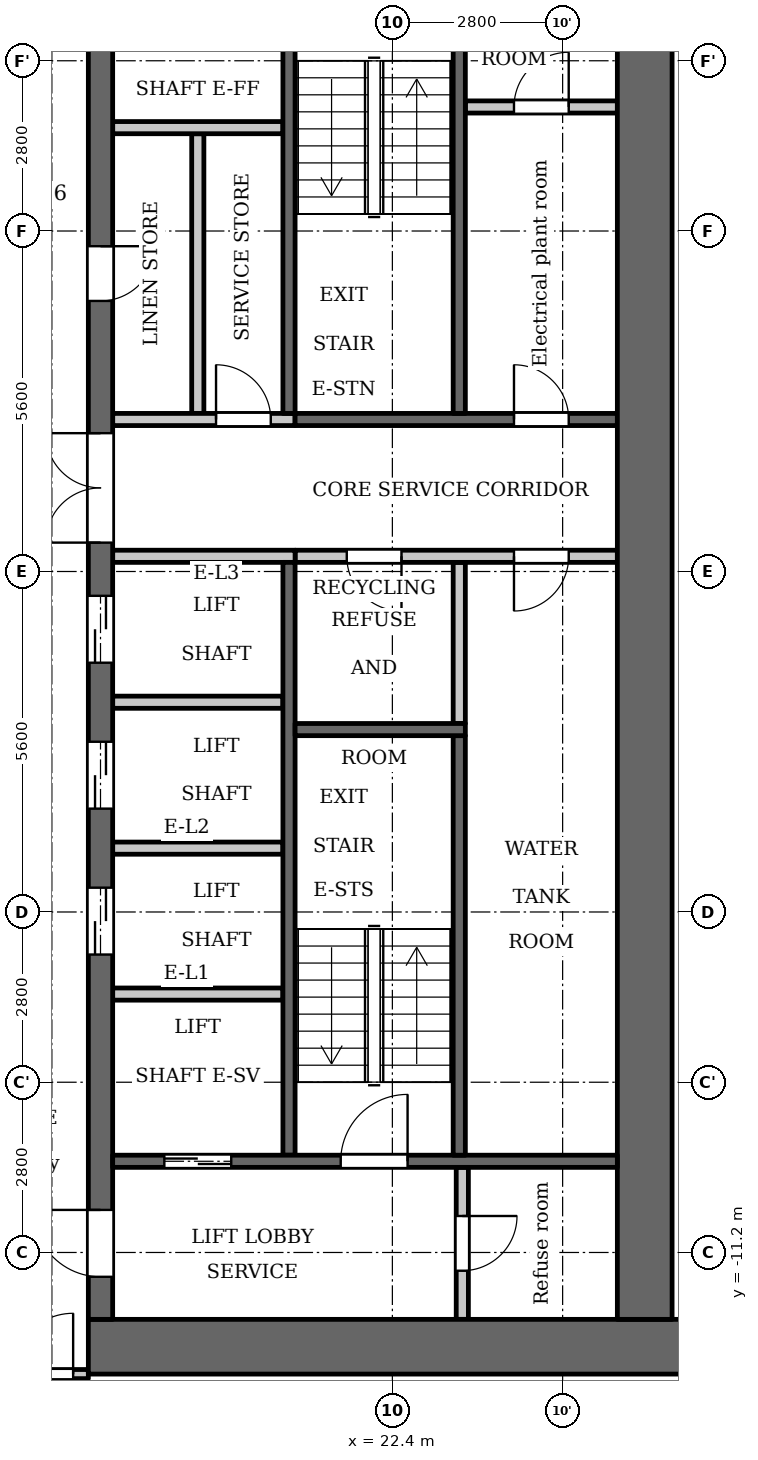
"""IFC4 building model, lengths in metres.
Left out: names, types, materials, properties, quantities, classifications, styles, units other than length and angle.
Written with IfcOpenShell. Run it as: python <this file> out.ifc"""

import sys

from ifc_helpers import new_model, si_unit, direction, frame, frame_2d, origin, place, context, subcontext, project, spatial, rectangle, extrude, element, fill, save


model = new_model("IFC4")
c1 = context("Model", 3, precision=1e-05, world=origin(), true_north=direction((0.0, 1.0)))
c2 = subcontext(c1, "Body", "Model", "MODEL_VIEW")
j1 = project(units=[si_unit("LENGTHUNIT", "METRE"), si_unit("PLANEANGLEUNIT", "RADIAN")], contexts=[c1])
p1 = place(None, origin())
s1 = spatial("IfcSite", under=j1, at=p1, CompositionType="ELEMENT")
p2 = place(p1, origin())
s2 = spatial("IfcBuilding", under=s1, at=p2, CompositionType="ELEMENT")
p3 = place(p2, frame((0.0, 0.0, 104.3)))
s3 = spatial("IfcBuildingStorey", under=s2, at=p3, CompositionType="ELEMENT", Elevation=104.3)
p4 = place(p3, frame((23.5, -2.5, 0.0), z_axis=(0.0, 0.0, 1.0), x_axis=(0.0, 1.0, 0.0)))
e1 = element("IfcWall", 1, at=p4, inside=s3, PredefinedType="PARTITIONING", context=c2, shape_type="SweptSolid", body=[
    extrude(rectangle(XDim=2.65, YDim=0.2, at=frame_2d((1.325, 0.0))), origin(), (0.0, 0.0, 1.0), 3.2),
])
p5 = place(p3, frame((20.7, 2.6, 0.0), z_axis=(0.0, 0.0, 1.0), x_axis=(0.0, 1.0, 0.0)))
e2 = element("IfcWall", 2, at=p5, inside=s3, PredefinedType="SHEAR", context=c2, shape_type="SweptSolid", body=[
    extrude(rectangle(XDim=7.0, YDim=0.2, at=frame_2d((3.5, 0.0))), origin(), (0.0, 0.0, 1.0), 3.2),
])
p6 = place(p3, frame((20.7, -9.6, 0.0), z_axis=(0.0, 0.0, 1.0), x_axis=(0.0, 1.0, 0.0)))
e3 = element("IfcWall", 3, at=p6, inside=s3, PredefinedType="SHEAR", context=c2, shape_type="SweptSolid", body=[
    extrude(rectangle(XDim=9.75, YDim=0.2, at=frame_2d((4.875, 0.0))), origin(), (0.0, 0.0, 1.0), 3.2),
])
p7 = place(p3, frame((20.8, 2.5, 0.0), z_axis=(0.0, 0.0, 1.0), x_axis=(1.0, 0.0, 0.0)))
e4 = element("IfcWall", 4, at=p7, inside=s3, PredefinedType="SHEAR", context=c2, shape_type="SweptSolid", body=[
    extrude(rectangle(XDim=5.3, YDim=0.2, at=frame_2d((2.65, 0.0))), origin(), (0.0, 0.0, 1.0), 3.2),
])
p8 = place(p7, frame((3.6, 0.0, 0.0)))
e5 = element("IfcOpeningElement", 5, at=p8, cuts=e4, PredefinedType="OPENING", context=c2, shape_type="SweptSolid", body=[
    extrude(rectangle(XDim=0.9, YDim=2.1, at=frame_2d((0.45, 1.05))), frame((0.0, 0.11, 0.0), z_axis=(0.0, -1.0, 0.0), x_axis=(1.0, 0.0, 0.0)), (0.0, 0.0, 1.0), 0.22),
])
p9 = place(p3, frame((20.8, 0.25, 0.0), z_axis=(0.0, 0.0, 1.0), x_axis=(1.0, 0.0, 0.0)))
e6 = element("IfcWall", 6, at=p9, inside=s3, PredefinedType="PARTITIONING", context=c2, shape_type="SweptSolid", body=[
    extrude(rectangle(XDim=5.3, YDim=0.2, at=frame_2d((2.65, 0.0))), origin(), (0.0, 0.0, 1.0), 3.2),
])
p10 = place(p9, frame((0.85, 0.0, 0.0)))
e7 = element("IfcOpeningElement", 7, at=p10, cuts=e6, PredefinedType="OPENING", context=c2, shape_type="SweptSolid", body=[
    extrude(rectangle(XDim=0.9, YDim=2.1, at=frame_2d((0.45, 1.05))), frame((0.0, 0.11, 0.0), z_axis=(0.0, -1.0, 0.0), x_axis=(1.0, 0.0, 0.0)), (0.0, 0.0, 1.0), 0.22),
])
p11 = place(p9, frame((3.6, 0.0, 0.0)))
e8 = element("IfcOpeningElement", 8, at=p11, cuts=e6, PredefinedType="OPENING", context=c2, shape_type="SweptSolid", body=[
    extrude(rectangle(XDim=0.9, YDim=2.1, at=frame_2d((0.45, 1.05))), frame((0.0, 0.11, 0.0), z_axis=(0.0, -1.0, 0.0), x_axis=(1.0, 0.0, 0.0)), (0.0, 0.0, 1.0), 0.22),
])
p12 = place(p3, frame((17.4, -12.75, 0.0), z_axis=(0.0, 0.0, 1.0), x_axis=(1.0, 0.0, 0.0)))
e9 = element("IfcWall", 9, at=p12, inside=s3, PredefinedType="SHEAR", context=c2, shape_type="SweptSolid", body=[
    extrude(rectangle(XDim=10.4, YDim=0.9, at=frame_2d((5.2, 0.0))), origin(), (0.0, 0.0, 1.0), 3.2),
])
p13 = place(p3, frame((19.2, 2.6, 0.0), z_axis=(0.0, 0.0, 1.0), x_axis=(0.0, 1.0, 0.0)))
e10 = element("IfcWall", 10, at=p13, inside=s3, PredefinedType="PARTITIONING", context=c2, shape_type="SweptSolid", body=[
    extrude(rectangle(XDim=4.6, YDim=0.2, at=frame_2d((2.3, 0.0))), origin(), (0.0, 0.0, 1.0), 3.2),
])
p14 = place(p3, frame((17.6, -12.3, 0.0), z_axis=(0.0, 0.0, 1.0), x_axis=(0.0, 1.0, 0.0)))
e11 = element("IfcWall", 11, at=p14, inside=s3, PredefinedType="SHEAR", context=c2, shape_type="SweptSolid", body=[
    extrude(rectangle(XDim=24.6, YDim=0.4, at=frame_2d((12.3, 0.0))), origin(), (0.0, 0.0, 1.0), 3.2),
])
p15 = place(p14, frame((6.0, 0.0, 0.0)))
e12 = element("IfcOpeningElement", 12, at=p15, cuts=e11, PredefinedType="OPENING", context=c2, shape_type="SweptSolid", body=[
    extrude(rectangle(XDim=1.1, YDim=2.1, at=frame_2d((0.55, 1.05))), frame((0.0, 0.21, 0.0), z_axis=(0.0, -1.0, 0.0), x_axis=(1.0, 0.0, 0.0)), (0.0, 0.0, 1.0), 0.42),
])
p16 = place(p14, frame((8.4, 0.0, 0.0)))
e13 = element("IfcOpeningElement", 13, at=p16, cuts=e11, PredefinedType="OPENING", context=c2, shape_type="SweptSolid", body=[
    extrude(rectangle(XDim=1.1, YDim=2.1, at=frame_2d((0.55, 1.05))), frame((0.0, 0.21, 0.0), z_axis=(0.0, -1.0, 0.0), x_axis=(1.0, 0.0, 0.0)), (0.0, 0.0, 1.0), 0.42),
])
p17 = place(p14, frame((10.8, 0.0, 0.0)))
e14 = element("IfcOpeningElement", 14, at=p17, cuts=e11, PredefinedType="OPENING", context=c2, shape_type="SweptSolid", body=[
    extrude(rectangle(XDim=1.1, YDim=2.1, at=frame_2d((0.55, 1.05))), frame((0.0, 0.21, 0.0), z_axis=(0.0, -1.0, 0.0), x_axis=(1.0, 0.0, 0.0)), (0.0, 0.0, 1.0), 0.42),
])
p18 = place(p14, frame((16.75, 0.0, 0.0)))
e15 = element("IfcOpeningElement", 15, at=p18, cuts=e11, PredefinedType="OPENING", context=c2, shape_type="SweptSolid", body=[
    extrude(rectangle(XDim=0.9, YDim=2.1, at=frame_2d((0.45, 1.05))), frame((0.0, 0.21, 0.0), z_axis=(0.0, -1.0, 0.0), x_axis=(1.0, 0.0, 0.0)), (0.0, 0.0, 1.0), 0.42),
])
p19 = place(p14, frame((22.8, 0.0, 0.0)))
e16 = element("IfcOpeningElement", 16, at=p19, cuts=e11, PredefinedType="OPENING", context=c2, shape_type="SweptSolid", body=[
    extrude(rectangle(XDim=1.1, YDim=2.1, at=frame_2d((0.55, 1.05))), frame((0.0, 0.21, 0.0), z_axis=(0.0, -1.0, 0.0), x_axis=(1.0, 0.0, 0.0)), (0.0, 0.0, 1.0), 0.42),
])
p20 = place(p14, frame((0.7, 0.0, 0.0)))
e17 = element("IfcOpeningElement", 17, at=p20, cuts=e11, PredefinedType="OPENING", context=c2, shape_type="SweptSolid", body=[
    extrude(rectangle(XDim=1.1, YDim=2.1, at=frame_2d((0.55, 1.05))), frame((0.0, 0.21, 0.0), z_axis=(0.0, -1.0, 0.0), x_axis=(1.0, 0.0, 0.0)), (0.0, 0.0, 1.0), 0.42),
])
p21 = place(p14, frame((12.775, 0.0, 0.0)))
e18 = element("IfcOpeningElement", 18, at=p21, cuts=e11, PredefinedType="OPENING", context=c2, shape_type="SweptSolid", body=[
    extrude(rectangle(XDim=1.8, YDim=2.1, at=frame_2d((0.9, 1.05))), frame((0.0, 0.21, 0.0), z_axis=(0.0, -1.0, 0.0), x_axis=(1.0, 0.0, 0.0)), (0.0, 0.0, 1.0), 0.42),
])
p22 = place(p3, frame((26.55, -12.3, 0.0), z_axis=(0.0, 0.0, 1.0), x_axis=(0.0, 1.0, 0.0)))
e19 = element("IfcWall", 19, at=p22, inside=s3, PredefinedType="SHEAR", context=c2, shape_type="SweptSolid", body=[
    extrude(rectangle(XDim=24.6, YDim=0.9, at=frame_2d((12.3, 0.0))), origin(), (0.0, 0.0, 1.0), 3.2),
])
p23 = place(p3, frame((23.55, -12.3, 0.0), z_axis=(0.0, 0.0, 1.0), x_axis=(0.0, 1.0, 0.0)))
e20 = element("IfcWall", 20, at=p23, inside=s3, PredefinedType="PARTITIONING", context=c2, shape_type="SweptSolid", body=[
    extrude(rectangle(XDim=2.5, YDim=0.2, at=frame_2d((1.25, 0.0))), origin(), (0.0, 0.0, 1.0), 3.2),
])
p24 = place(p23, frame((0.8, 0.0, 0.0)))
e21 = element("IfcOpeningElement", 21, at=p24, cuts=e20, PredefinedType="OPENING", context=c2, shape_type="SweptSolid", body=[
    extrude(rectangle(XDim=0.9, YDim=2.1, at=frame_2d((0.45, 1.05))), frame((0.0, 0.11, 0.0), z_axis=(0.0, -1.0, 0.0), x_axis=(1.0, 0.0, 0.0)), (0.0, 0.0, 1.0), 0.22),
])
p25 = place(p3, frame((23.6, 7.64, 0.0), z_axis=(0.0, 0.0, 1.0), x_axis=(1.0, 0.0, 0.0)))
e22 = element("IfcWall", 22, at=p25, inside=s3, PredefinedType="PARTITIONING", context=c2, shape_type="SweptSolid", body=[
    extrude(rectangle(XDim=2.5, YDim=0.2, at=frame_2d((1.25, 0.0))), origin(), (0.0, 0.0, 1.0), 3.2),
])
p26 = place(p25, frame((0.8, 0.0, 0.0)))
e23 = element("IfcOpeningElement", 23, at=p26, cuts=e22, PredefinedType="OPENING", context=c2, shape_type="SweptSolid", body=[
    extrude(rectangle(XDim=0.9, YDim=2.1, at=frame_2d((0.45, 1.05))), frame((0.0, 0.11, 0.0), z_axis=(0.0, -1.0, 0.0), x_axis=(1.0, 0.0, 0.0)), (0.0, 0.0, 1.0), 0.22),
])
p27 = place(p3, frame((17.8, -9.7, 0.0), z_axis=(0.0, 0.0, 1.0), x_axis=(1.0, 0.0, 0.0)))
e24 = element("IfcWall", 24, at=p27, inside=s3, PredefinedType="SHEAR", context=c2, shape_type="SweptSolid", body=[
    extrude(rectangle(XDim=8.3, YDim=0.2, at=frame_2d((4.15, 0.0))), origin(), (0.0, 0.0, 1.0), 3.2),
])
p28 = place(p27, frame((0.85, 0.0, 0.0)))
e25 = element("IfcOpeningElement", 25, at=p28, cuts=e24, PredefinedType="OPENING", context=c2, shape_type="SweptSolid", body=[
    extrude(rectangle(XDim=1.1, YDim=2.1, at=frame_2d((0.55, 1.05))), frame((0.0, 0.11, 0.0), z_axis=(0.0, -1.0, 0.0), x_axis=(1.0, 0.0, 0.0)), (0.0, 0.0, 1.0), 0.22),
])
p29 = place(p27, frame((3.75, 0.0, 0.0)))
e26 = element("IfcOpeningElement", 26, at=p29, cuts=e24, PredefinedType="OPENING", context=c2, shape_type="SweptSolid", body=[
    extrude(rectangle(XDim=1.1, YDim=2.1, at=frame_2d((0.55, 1.05))), frame((0.0, 0.11, 0.0), z_axis=(0.0, -1.0, 0.0), x_axis=(1.0, 0.0, 0.0)), (0.0, 0.0, 1.0), 0.22),
])
for number, where, z_axis, x_axis in (
    (27, (17.8, -6.95, 0.0), (0.0, 0.0, 1.0), (1.0, 0.0, 0.0)),
    (28, (17.8, -4.55, 0.0), (0.0, 0.0, 1.0), (1.0, 0.0, 0.0)),
    (29, (17.8, -2.15, 0.0), (0.0, 0.0, 1.0), (1.0, 0.0, 0.0)),
):
    element("IfcWall", number, at=place(p3, frame(where, z_axis=z_axis, x_axis=x_axis)), inside=s3, PredefinedType="PARTITIONING", context=c2, shape_type="SweptSolid", body=[
        extrude(rectangle(XDim=2.8, YDim=0.2, at=frame_2d((1.4, 0.0))), origin(), (0.0, 0.0, 1.0), 3.2),
    ])
p30 = place(p3, frame((17.8, 0.25, 0.0), z_axis=(0.0, 0.0, 1.0), x_axis=(1.0, 0.0, 0.0)))
e30 = element("IfcWall", 30, at=p30, inside=s3, PredefinedType="PARTITIONING", context=c2, shape_type="SweptSolid", body=[
    extrude(rectangle(XDim=3.0, YDim=0.2, at=frame_2d((1.5, 0.0))), origin(), (0.0, 0.0, 1.0), 3.2),
])
p31 = place(p3, frame((17.8, 2.5, 0.0), z_axis=(0.0, 0.0, 1.0), x_axis=(1.0, 0.0, 0.0)))
e31 = element("IfcWall", 31, at=p31, inside=s3, PredefinedType="PARTITIONING", context=c2, shape_type="SweptSolid", body=[
    extrude(rectangle(XDim=3.0, YDim=0.2, at=frame_2d((1.5, 0.0))), origin(), (0.0, 0.0, 1.0), 3.2),
])
p32 = place(p31, frame((1.7, 0.0, 0.0)))
e32 = element("IfcOpeningElement", 32, at=p32, cuts=e31, PredefinedType="OPENING", context=c2, shape_type="SweptSolid", body=[
    extrude(rectangle(XDim=0.9, YDim=2.1, at=frame_2d((0.45, 1.05))), frame((0.0, 0.11, 0.0), z_axis=(0.0, -1.0, 0.0), x_axis=(1.0, 0.0, 0.0)), (0.0, 0.0, 1.0), 0.22),
])
p33 = place(p3, frame((17.8, 7.3, 0.0), z_axis=(0.0, 0.0, 1.0), x_axis=(1.0, 0.0, 0.0)))
e33 = element("IfcWall", 33, at=p33, inside=s3, PredefinedType="PARTITIONING", context=c2, shape_type="SweptSolid", body=[
    extrude(rectangle(XDim=2.8, YDim=0.2, at=frame_2d((1.4, 0.0))), origin(), (0.0, 0.0, 1.0), 3.2),
])
p34 = place(p3, frame((23.5, 2.6, 0.0), z_axis=(0.0, 0.0, 1.0), x_axis=(0.0, 1.0, 0.0)))
e34 = element("IfcWall", 34, at=p34, inside=s3, PredefinedType="SHEAR", context=c2, shape_type="SweptSolid", body=[
    extrude(rectangle(XDim=7.0, YDim=0.2, at=frame_2d((3.5, 0.0))), origin(), (0.0, 0.0, 1.0), 3.2),
])
p35 = place(p3, frame((23.5, -9.6, 0.0), z_axis=(0.0, 0.0, 1.0), x_axis=(0.0, 1.0, 0.0)))
e35 = element("IfcWall", 35, at=p35, inside=s3, PredefinedType="SHEAR", context=c2, shape_type="SweptSolid", body=[
    extrude(rectangle(XDim=6.9, YDim=0.2, at=frame_2d((3.45, 0.0))), origin(), (0.0, 0.0, 1.0), 3.2),
])
p36 = place(p3, frame((20.8, -2.6, 0.0), z_axis=(0.0, 0.0, 1.0), x_axis=(1.0, 0.0, 0.0)))
e36 = element("IfcWall", 36, at=p36, inside=s3, PredefinedType="SHEAR", context=c2, shape_type="SweptSolid", body=[
    extrude(rectangle(XDim=2.8, YDim=0.2, at=frame_2d((1.4, 0.0))), origin(), (0.0, 0.0, 1.0), 3.2),
])
p37 = place(p3, frame((-17.4, -13.2, 0.0), z_axis=(0.0, 0.0, 1.0), x_axis=(1.0, 0.0, 0.0)))
e37 = element("IfcWall", 37, at=p37, inside=s3, PredefinedType="PARTITIONING", context=c2, shape_type="SweptSolid", body=[
    extrude(rectangle(XDim=34.8, YDim=0.15, at=frame_2d((17.4, 0.0))), origin(), (0.0, 0.0, 1.0), 3.2),
])
p38 = place(p37, frame((0.15, 0.0, 0.0)))
e38 = element("IfcOpeningElement", 38, at=p38, cuts=e37, PredefinedType="OPENING", context=c2, shape_type="SweptSolid", body=[
    extrude(rectangle(XDim=1.0, YDim=2.1, at=frame_2d((0.5, 1.05))), frame((0.0, 0.085, 0.0), z_axis=(0.0, -1.0, 0.0), x_axis=(1.0, 0.0, 0.0)), (0.0, 0.0, 1.0), 0.17),
])
p39 = place(p37, frame((33.55, 0.0, 0.0)))
e39 = element("IfcOpeningElement", 39, at=p39, cuts=e37, PredefinedType="OPENING", context=c2, shape_type="SweptSolid", body=[
    extrude(rectangle(XDim=1.0, YDim=2.1, at=frame_2d((0.5, 1.05))), frame((0.0, 0.085, 0.0), z_axis=(0.0, -1.0, 0.0), x_axis=(1.0, 0.0, 0.0)), (0.0, 0.0, 1.0), 0.17),
])
p40 = place(p37, frame((8.1, 0.0, 0.0)))
e40 = element("IfcOpeningElement", 40, at=p40, cuts=e37, PredefinedType="OPENING", context=c2, shape_type="SweptSolid", body=[
    extrude(rectangle(XDim=1.0, YDim=2.1, at=frame_2d((0.5, 1.05))), frame((0.0, 0.085, 0.0), z_axis=(0.0, -1.0, 0.0), x_axis=(1.0, 0.0, 0.0)), (0.0, 0.0, 1.0), 0.17),
])
p41 = place(p37, frame((12.45, 0.0, 0.0)))
e41 = element("IfcOpeningElement", 41, at=p41, cuts=e37, PredefinedType="OPENING", context=c2, shape_type="SweptSolid", body=[
    extrude(rectangle(XDim=1.0, YDim=2.1, at=frame_2d((0.5, 1.05))), frame((0.0, 0.085, 0.0), z_axis=(0.0, -1.0, 0.0), x_axis=(1.0, 0.0, 0.0)), (0.0, 0.0, 1.0), 0.17),
])
p42 = place(p37, frame((19.05, 0.0, 0.0)))
e42 = element("IfcOpeningElement", 42, at=p42, cuts=e37, PredefinedType="OPENING", context=c2, shape_type="SweptSolid", body=[
    extrude(rectangle(XDim=1.0, YDim=2.1, at=frame_2d((0.5, 1.05))), frame((0.0, 0.085, 0.0), z_axis=(0.0, -1.0, 0.0), x_axis=(1.0, 0.0, 0.0)), (0.0, 0.0, 1.0), 0.17),
])
p43 = place(p37, frame((24.9, 0.0, 0.0)))
e43 = element("IfcOpeningElement", 43, at=p43, cuts=e37, PredefinedType="OPENING", context=c2, shape_type="SweptSolid", body=[
    extrude(rectangle(XDim=1.0, YDim=2.1, at=frame_2d((0.5, 1.05))), frame((0.0, 0.085, 0.0), z_axis=(0.0, -1.0, 0.0), x_axis=(1.0, 0.0, 0.0)), (0.0, 0.0, 1.0), 0.17),
])
p44 = place(p28, origin())
e44 = element("IfcDoor", 44, at=p44, inside=s3, OperationType="DOUBLE_DOOR_SLIDING", PredefinedType="DOOR", context=c2, shape_type="SweptSolid", body=[
    extrude(rectangle(XDim=1.1, YDim=2.1, at=frame_2d((0.55, 1.05))), frame((0.0, 0.025, 0.0), z_axis=(0.0, -1.0, 0.0), x_axis=(1.0, 0.0, 0.0)), (0.0, 0.0, 1.0), 0.05),
])
fill(e25, e44)
p45 = place(p15, origin())
e45 = element("IfcDoor", 45, at=p45, inside=s3, OperationType="DOUBLE_DOOR_SLIDING", PredefinedType="DOOR", context=c2, shape_type="SweptSolid", body=[
    extrude(rectangle(XDim=1.1, YDim=2.1, at=frame_2d((0.55, 1.05))), frame((0.0, 0.025, 0.0), z_axis=(0.0, -1.0, 0.0), x_axis=(1.0, 0.0, 0.0)), (0.0, 0.0, 1.0), 0.05),
])
fill(e12, e45)
p46 = place(p16, origin())
e46 = element("IfcDoor", 46, at=p46, inside=s3, OperationType="DOUBLE_DOOR_SLIDING", PredefinedType="DOOR", context=c2, shape_type="SweptSolid", body=[
    extrude(rectangle(XDim=1.1, YDim=2.1, at=frame_2d((0.55, 1.05))), frame((0.0, 0.025, 0.0), z_axis=(0.0, -1.0, 0.0), x_axis=(1.0, 0.0, 0.0)), (0.0, 0.0, 1.0), 0.05),
])
fill(e13, e46)
p47 = place(p17, origin())
e47 = element("IfcDoor", 47, at=p47, inside=s3, OperationType="DOUBLE_DOOR_SLIDING", PredefinedType="DOOR", context=c2, shape_type="SweptSolid", body=[
    extrude(rectangle(XDim=1.1, YDim=2.1, at=frame_2d((0.55, 1.05))), frame((0.0, 0.025, 0.0), z_axis=(0.0, -1.0, 0.0), x_axis=(1.0, 0.0, 0.0)), (0.0, 0.0, 1.0), 0.05),
])
fill(e14, e47)
p48 = place(p18, origin())
e48 = element("IfcDoor", 48, at=p48, inside=s3, OperationType="SINGLE_SWING_RIGHT", PredefinedType="DOOR", context=c2, shape_type="SweptSolid", body=[
    extrude(rectangle(XDim=0.9, YDim=2.1, at=frame_2d((0.45, 1.05))), frame((0.0, 0.025, 0.0), z_axis=(0.0, -1.0, 0.0), x_axis=(1.0, 0.0, 0.0)), (0.0, 0.0, 1.0), 0.05),
])
fill(e15, e48)
p49 = place(p32, origin())
e49 = element("IfcDoor", 49, at=p49, inside=s3, OperationType="SINGLE_SWING_RIGHT", PredefinedType="DOOR", context=c2, shape_type="SweptSolid", body=[
    extrude(rectangle(XDim=0.9, YDim=2.1, at=frame_2d((0.45, 1.05))), frame((0.0, 0.025, 0.0), z_axis=(0.0, -1.0, 0.0), x_axis=(1.0, 0.0, 0.0)), (0.0, 0.0, 1.0), 0.05),
])
fill(e32, e49)
p50 = place(p20, origin())
e50 = element("IfcDoor", 50, at=p50, inside=s3, OperationType="SINGLE_SWING_LEFT", PredefinedType="DOOR", context=c2, shape_type="SweptSolid", body=[
    extrude(rectangle(XDim=1.1, YDim=2.1, at=frame_2d((0.55, 1.05))), frame((0.0, 0.025, 0.0), z_axis=(0.0, -1.0, 0.0), x_axis=(1.0, 0.0, 0.0)), (0.0, 0.0, 1.0), 0.05),
])
fill(e17, e50)
p51 = place(p24, origin())
e51 = element("IfcDoor", 51, at=p51, inside=s3, OperationType="SINGLE_SWING_RIGHT", PredefinedType="DOOR", context=c2, shape_type="SweptSolid", body=[
    extrude(rectangle(XDim=0.9, YDim=2.1, at=frame_2d((0.45, 1.05))), frame((0.0, 0.025, 0.0), z_axis=(0.0, -1.0, 0.0), x_axis=(1.0, 0.0, 0.0)), (0.0, 0.0, 1.0), 0.05),
])
fill(e21, e51)
p52 = place(p29, origin())
e52 = element("IfcDoor", 52, at=p52, inside=s3, OperationType="SINGLE_SWING_LEFT", PredefinedType="DOOR", context=c2, shape_type="SweptSolid", body=[
    extrude(rectangle(XDim=1.1, YDim=2.1, at=frame_2d((0.55, 1.05))), frame((0.0, 0.025, 0.0), z_axis=(0.0, -1.0, 0.0), x_axis=(1.0, 0.0, 0.0)), (0.0, 0.0, 1.0), 0.05),
])
fill(e26, e52)
p53 = place(p21, origin())
e53 = element("IfcDoor", 53, at=p53, inside=s3, OperationType="DOUBLE_DOOR_SINGLE_SWING", PredefinedType="DOOR", context=c2, shape_type="SweptSolid", body=[
    extrude(rectangle(XDim=1.8, YDim=2.1, at=frame_2d((0.9, 1.05))), frame((0.0, 0.025, 0.0), z_axis=(0.0, -1.0, 0.0), x_axis=(1.0, 0.0, 0.0)), (0.0, 0.0, 1.0), 0.05),
])
fill(e18, e53)
p54 = place(p10, origin())
e54 = element("IfcDoor", 54, at=p54, inside=s3, OperationType="SINGLE_SWING_RIGHT", PredefinedType="DOOR", context=c2, shape_type="SweptSolid", body=[
    extrude(rectangle(XDim=0.9, YDim=2.1, at=frame_2d((0.45, 1.05))), frame((0.0, 0.025, 0.0), z_axis=(0.0, -1.0, 0.0), x_axis=(1.0, 0.0, 0.0)), (0.0, 0.0, 1.0), 0.05),
])
fill(e7, e54)
p55 = place(p11, origin())
e55 = element("IfcDoor", 55, at=p55, inside=s3, OperationType="SINGLE_SWING_LEFT", PredefinedType="DOOR", context=c2, shape_type="SweptSolid", body=[
    extrude(rectangle(XDim=0.9, YDim=2.1, at=frame_2d((0.45, 1.05))), frame((0.0, 0.025, 0.0), z_axis=(0.0, -1.0, 0.0), x_axis=(1.0, 0.0, 0.0)), (0.0, 0.0, 1.0), 0.05),
])
fill(e8, e55)
p56 = place(p26, origin())
e56 = element("IfcDoor", 56, at=p56, inside=s3, OperationType="SINGLE_SWING_LEFT", PredefinedType="DOOR", context=c2, shape_type="SweptSolid", body=[
    extrude(rectangle(XDim=0.9, YDim=2.1, at=frame_2d((0.45, 1.05))), frame((0.0, 0.025, 0.0), z_axis=(0.0, -1.0, 0.0), x_axis=(1.0, 0.0, 0.0)), (0.0, 0.0, 1.0), 0.05),
])
fill(e23, e56)
p57 = place(p8, origin())
e57 = element("IfcDoor", 57, at=p57, inside=s3, OperationType="SINGLE_SWING_RIGHT", PredefinedType="DOOR", context=c2, shape_type="SweptSolid", body=[
    extrude(rectangle(XDim=0.9, YDim=2.1, at=frame_2d((0.45, 1.05))), frame((0.0, 0.025, 0.0), z_axis=(0.0, -1.0, 0.0), x_axis=(1.0, 0.0, 0.0)), (0.0, 0.0, 1.0), 0.05),
])
fill(e5, e57)
p58 = place(p39, origin())
e58 = element("IfcDoor", 58, at=p58, inside=s3, OperationType="SINGLE_SWING_LEFT", PredefinedType="DOOR", context=c2, shape_type="SweptSolid", body=[
    extrude(rectangle(XDim=1.0, YDim=2.1, at=frame_2d((0.5, 1.05))), frame((0.0, 0.025, 0.0), z_axis=(0.0, -1.0, 0.0), x_axis=(1.0, 0.0, 0.0)), (0.0, 0.0, 1.0), 0.05),
])
fill(e39, e58)
save(model, sys.argv[1])
